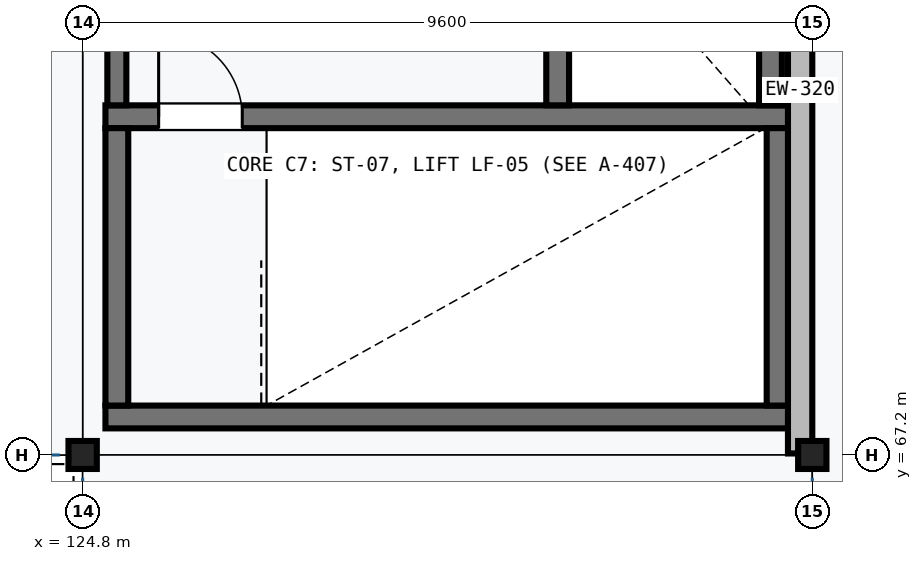
"""IFC4 building model, lengths in metres.
Left out: names, types, materials, properties, quantities, classifications, styles, units other than length and angle.
Written with IfcOpenShell. Run it as: python <this file> out.ifc"""

import sys

from ifc_helpers import new_model, si_unit, direction, frame, frame_2d, origin, origin_2d, place, context, subcontext, project, spatial, rectangle, i_section, extrude, element, fill, save


model = new_model("IFC4")
c1 = context("Model", 3, precision=1e-05, world=origin(), true_north=direction((0.0, 1.0)))
c2 = subcontext(c1, "Body", "Model", "MODEL_VIEW")
j1 = project(units=[si_unit("LENGTHUNIT", "METRE"), si_unit("PLANEANGLEUNIT", "RADIAN")], contexts=[c1])
p1 = place(None, origin())
s1 = spatial("IfcSite", under=j1, at=p1, CompositionType="ELEMENT")
p2 = place(p1, origin())
s2 = spatial("IfcBuilding", under=s1, at=p2, CompositionType="ELEMENT")
p3 = place(p2, frame((0.0, 0.0, 6.0)))
s3 = spatial("IfcBuildingStorey", under=s2, at=p3, CompositionType="ELEMENT", Elevation=6.0)
for number, where, z_axis, x_axis in (
    (1, (124.8, 67.2, 0.0), (0.0, 0.0, 1.0), (1.0, 0.0, 0.0)),
    (2, (134.4, 67.2, 0.0), (0.0, 0.0, 1.0), (1.0, 0.0, 0.0)),
):
    element("IfcColumn", number, at=place(p3, frame(where, z_axis=z_axis, x_axis=x_axis)), inside=s3, PredefinedType="COLUMN", context=c2, shape_type="SweptSolid", body=[
        extrude(i_section(OverallWidth=0.373, OverallDepth=0.368, WebThickness=0.014, FlangeThickness=0.024, FilletRadius=0.015, at=origin_2d()), origin(), (0.0, 0.0, 1.0), 4.25),
    ])
p4 = place(p3, frame((125.1, 67.7, 0.0), z_axis=(0.0, 0.0, 1.0), x_axis=(1.0, 0.0, 0.0)))
e3 = element("IfcWall", 3, at=p4, inside=s3, PredefinedType="SHEAR", context=c2, shape_type="SweptSolid", body=[
    extrude(rectangle(XDim=9.0, YDim=0.3, at=frame_2d((4.5, 0.0))), origin(), (0.0, 0.0, 1.0), 4.25),
])
p5 = place(p3, frame((134.1, 71.65, 0.0), z_axis=(0.0, 0.0, 1.0), x_axis=(-1.0, 0.0, 0.0)))
e4 = element("IfcWall", 4, at=p5, inside=s3, PredefinedType="SHEAR", context=c2, shape_type="SweptSolid", body=[
    extrude(rectangle(XDim=9.0, YDim=0.3, at=frame_2d((4.5, 0.0))), origin(), (0.0, 0.0, 1.0), 4.5),
])
p6 = place(p5, frame((7.2, 0.0, 0.0)))
e5 = element("IfcOpeningElement", 5, at=p6, cuts=e4, PredefinedType="OPENING", context=c2, shape_type="SweptSolid", body=[
    extrude(rectangle(XDim=1.1, YDim=2.15, at=frame_2d((0.55, 1.075))), frame((0.0, 0.16, 0.0), z_axis=(0.0, -1.0, 0.0), x_axis=(1.0, 0.0, 0.0)), (0.0, 0.0, 1.0), 0.32),
])
for number, where, z_axis, x_axis in (
    (6, (125.25, 67.85, 0.0), (0.0, 0.0, 1.0), (0.0, 1.0, 0.0)),
    (7, (133.95, 71.5, 0.0), (0.0, 0.0, 1.0), (0.0, -1.0, 0.0)),
):
    element("IfcWall", number, at=place(p3, frame(where, z_axis=z_axis, x_axis=x_axis)), inside=s3, PredefinedType="SHEAR", context=c2, shape_type="SweptSolid", body=[
        extrude(rectangle(XDim=3.65, YDim=0.3, at=frame_2d((1.825, 0.0))), origin(), (0.0, 0.0, 1.0), 4.25),
    ])
p7 = place(p3, frame((131.05, 74.5, 0.0), z_axis=(0.0, 0.0, 1.0), x_axis=(0.0, -1.0, 0.0)))
e8 = element("IfcWall", 8, at=p7, inside=s3, PredefinedType="SHEAR", context=c2, shape_type="SweptSolid", body=[
    extrude(rectangle(XDim=2.7, YDim=0.3, at=frame_2d((1.35, 0.0))), origin(), (0.0, 0.0, 1.0), 4.5),
])
p8 = place(p7, frame((0.74, 0.0, 0.0)))
e9 = element("IfcOpeningElement", 9, at=p8, cuts=e8, PredefinedType="OPENING", context=c2, shape_type="SweptSolid", body=[
    extrude(rectangle(XDim=1.22, YDim=2.15, at=frame_2d((0.61, 1.075))), frame((0.0, 0.16, 0.0), z_axis=(0.0, -1.0, 0.0), x_axis=(1.0, 0.0, 0.0)), (0.0, 0.0, 1.0), 0.32),
])
p9 = place(p3, frame((133.85, 71.8, 0.0), z_axis=(0.0, 0.0, 1.0), x_axis=(0.0, 1.0, 0.0)))
e10 = element("IfcWall", 10, at=p9, inside=s3, PredefinedType="SHEAR", context=c2, shape_type="SweptSolid", body=[
    extrude(rectangle(XDim=2.7, YDim=0.3, at=frame_2d((1.35, 0.0))), origin(), (0.0, 0.0, 1.0), 4.5),
])
p10 = place(p3, frame((125.25, 71.8, 0.0), z_axis=(0.0, 0.0, 1.0), x_axis=(0.0, 1.0, 0.0)))
e11 = element("IfcWall", 11, at=p10, inside=s3, PredefinedType="SHEAR", context=c2, shape_type="SweptSolid", body=[
    extrude(rectangle(XDim=2.7, YDim=0.25, at=frame_2d((1.35, 0.0))), origin(), (0.0, 0.0, 1.0), 4.25),
])
p11 = place(p10, frame((0.75, 0.0, 0.0)))
e12 = element("IfcOpeningElement", 12, at=p11, cuts=e11, PredefinedType="OPENING", context=c2, shape_type="SweptSolid", body=[
    extrude(rectangle(XDim=1.2, YDim=2.15, at=frame_2d((0.6, 1.075))), frame((0.0, 0.135, 0.0), z_axis=(0.0, -1.0, 0.0), x_axis=(1.0, 0.0, 0.0)), (0.0, 0.0, 1.0), 0.27),
])
p12 = place(p3, frame((134.24, 76.78, 0.0), z_axis=(0.0, 0.0, 1.0), x_axis=(0.0, -1.0, 0.0)))
e13 = element("IfcWall", 13, at=p12, inside=s3, PredefinedType="SOLIDWALL", context=c2, shape_type="SweptSolid", body=[
    extrude(rectangle(XDim=9.56, YDim=0.32, at=frame_2d((4.78, 0.0))), origin(), (0.0, 0.0, 1.0), 3.717),
])
p13 = place(p6, frame((1.1, 0.0, 0.0), z_axis=(0.0, 0.0, 1.0), x_axis=(-1.0, 0.0, 0.0)))
e14 = element("IfcDoor", 14, at=p13, inside=s3, OperationType="SINGLE_SWING_RIGHT", PredefinedType="DOOR", context=c2, shape_type="SweptSolid", body=[
    extrude(rectangle(XDim=1.1, YDim=2.15, at=frame_2d((0.55, 1.075))), frame((0.0, 0.025, 0.0), z_axis=(0.0, -1.0, 0.0), x_axis=(1.0, 0.0, 0.0)), (0.0, 0.0, 1.0), 0.05),
])
fill(e5, e14)
save(model, sys.argv[1])
